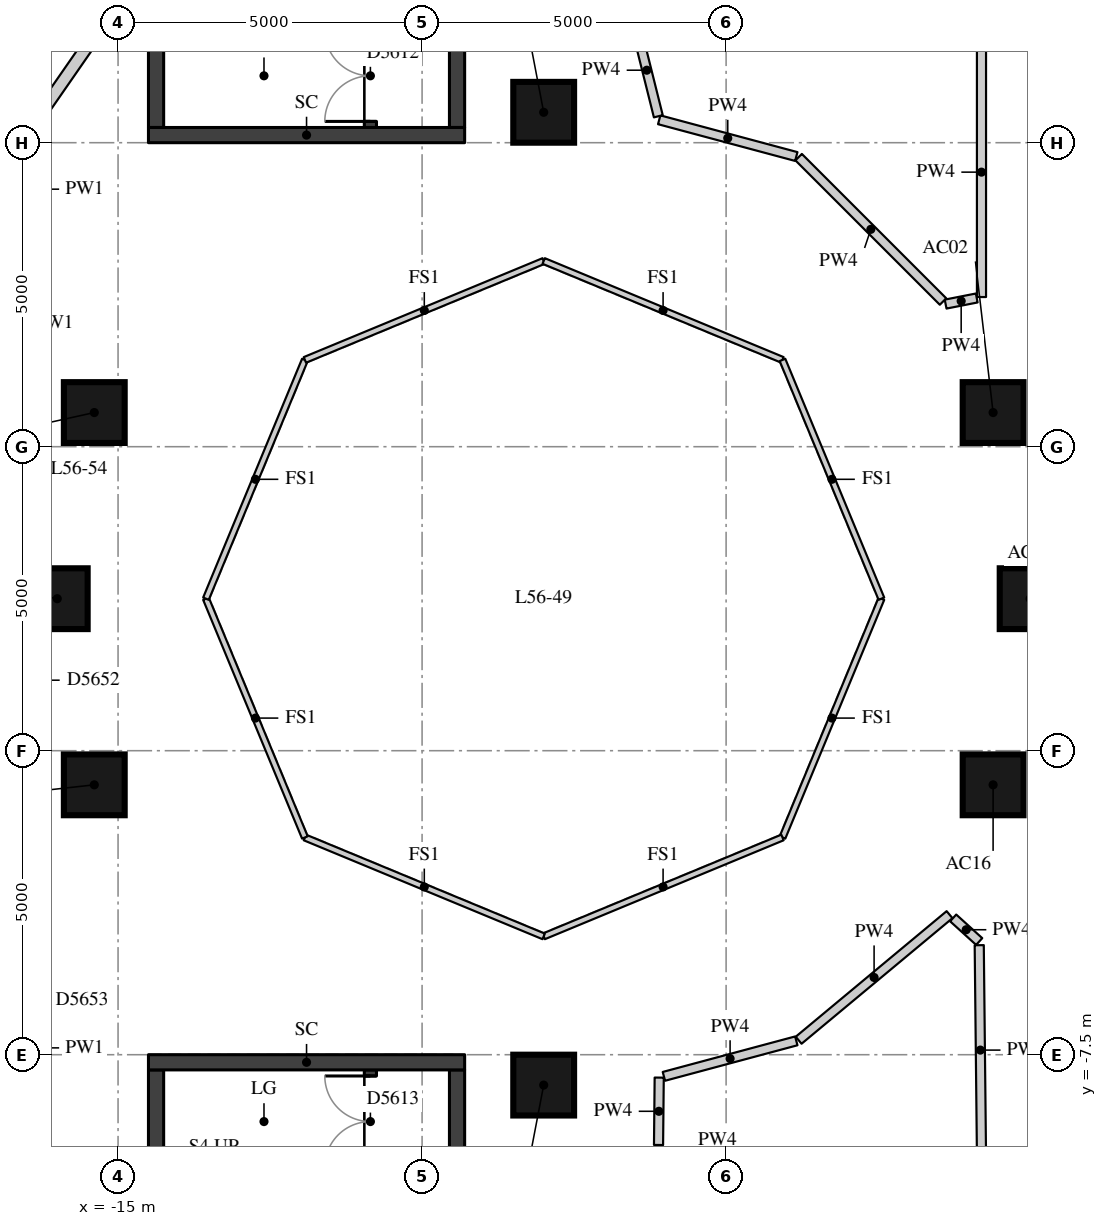
"""IFC4 building model, lengths in metres.
Left out: names, types, materials, properties, quantities, classifications, styles, units other than length and angle.
Written with IfcOpenShell. Run it as: python <this file> out.ifc"""

import sys

from ifc_helpers import new_model, si_unit, direction, frame, frame_2d, origin, origin_2d, place, context, subcontext, project, spatial, rectangle, extrude, element, fill, save


model = new_model("IFC4")
c1 = context("Model", 3, precision=1e-05, world=origin(), true_north=direction((0.0, 1.0)))
c2 = subcontext(c1, "Body", "Model", "MODEL_VIEW")
j1 = project(units=[si_unit("LENGTHUNIT", "METRE"), si_unit("PLANEANGLEUNIT", "RADIAN")], contexts=[c1])
p1 = place(None, origin())
s1 = spatial("IfcSite", under=j1, at=p1, CompositionType="ELEMENT")
p2 = place(p1, origin())
s2 = spatial("IfcBuilding", under=s1, at=p2, CompositionType="ELEMENT")
p3 = place(p2, frame((0.0, 0.0, 199.1)))
s3 = spatial("IfcBuildingStorey", under=s2, at=p3, CompositionType="ELEMENT", Elevation=199.1)
for number, where, z_axis, x_axis in (
    (1, (0.0, 0.0, 0.0), (0.0, 0.0, 1.0), (1.0, 0.0, 0.0)),
    (2, (-0.609, 3.062, 0.0), (0.0, 0.0, 1.0), (1.0, 0.0, 0.0)),
    (3, (-8.0, 8.0, 0.0), (0.0, 0.0, 1.0), (1.0, 0.0, 0.0)),
    (4, (-15.391, 3.062, 0.0), (0.0, 0.0, 1.0), (1.0, 0.0, 0.0)),
    (5, (-16.0, 0.0, 0.0), (0.0, 0.0, 1.0), (1.0, 0.0, 0.0)),
    (6, (-15.391, -3.062, 0.0), (0.0, 0.0, 1.0), (1.0, 0.0, 0.0)),
    (7, (-8.0, -8.0, 0.0), (0.0, 0.0, 1.0), (1.0, 0.0, 0.0)),
    (8, (-0.609, -3.062, 0.0), (0.0, 0.0, 1.0), (1.0, 0.0, 0.0)),
):
    element("IfcColumn", number, at=place(p3, frame(where, z_axis=z_axis, x_axis=x_axis)), inside=s3, PredefinedType="COLUMN", context=c2, shape_type="SweptSolid", body=[
        extrude(rectangle(XDim=1.0, YDim=1.0, at=origin_2d()), origin(), (0.0, 0.0, 1.0), 3.3),
    ])
p4 = place(p3, frame((-10.85, 7.75, 0.0), z_axis=(0.0, 0.0, 1.0), x_axis=(0.0, 1.0, 0.0)))
e9 = element("IfcWall", 9, at=p4, inside=s3, PredefinedType="SHEAR", context=c2, shape_type="SweptSolid", body=[
    extrude(rectangle(XDim=6.0, YDim=0.2, at=frame_2d((3.0, 0.0))), origin(), (0.0, 0.0, 1.0), 3.02),
])
p5 = place(p4, frame((0.1, 0.0, 0.0)))
e10 = element("IfcOpeningElement", 10, at=p5, cuts=e9, PredefinedType="OPENING", context=c2, shape_type="SweptSolid", body=[
    extrude(rectangle(XDim=1.5, YDim=2.1, at=frame_2d((0.75, 1.05))), frame((0.0, 0.11, 0.0), z_axis=(0.0, -1.0, 0.0), x_axis=(1.0, 0.0, 0.0)), (0.0, 0.0, 1.0), 0.22),
])
p6 = place(p3, frame((-10.85, -13.75, 0.0), z_axis=(0.0, 0.0, 1.0), x_axis=(0.0, 1.0, 0.0)))
e11 = element("IfcWall", 11, at=p6, inside=s3, PredefinedType="SHEAR", context=c2, shape_type="SweptSolid", body=[
    extrude(rectangle(XDim=6.0, YDim=0.2, at=frame_2d((3.0, 0.0))), origin(), (0.0, 0.0, 1.0), 3.02),
])
p7 = place(p6, frame((4.4, 0.0, 0.0)))
e12 = element("IfcOpeningElement", 12, at=p7, cuts=e11, PredefinedType="OPENING", context=c2, shape_type="SweptSolid", body=[
    extrude(rectangle(XDim=1.5, YDim=2.1, at=frame_2d((0.75, 1.05))), frame((0.0, 0.11, 0.0), z_axis=(0.0, -1.0, 0.0), x_axis=(1.0, 0.0, 0.0)), (0.0, 0.0, 1.0), 0.22),
])
p8 = place(p3, frame((-14.375, 7.75, -0.28), z_axis=(0.0, 0.0, 1.0), x_axis=(0.0, 1.0, 0.0)))
e13 = element("IfcWall", 13, at=p8, inside=s3, PredefinedType="SHEAR", context=c2, shape_type="SweptSolid", body=[
    extrude(rectangle(XDim=6.0, YDim=0.25, at=frame_2d((3.0, 0.0))), origin(), (0.0, 0.0, 1.0), 3.3),
])
p9 = place(p3, frame((-9.425, 7.75, -0.28), z_axis=(0.0, 0.0, 1.0), x_axis=(0.0, 1.0, 0.0)))
e14 = element("IfcWall", 14, at=p9, inside=s3, PredefinedType="SHEAR", context=c2, shape_type="SweptSolid", body=[
    extrude(rectangle(XDim=6.0, YDim=0.25, at=frame_2d((3.0, 0.0))), origin(), (0.0, 0.0, 1.0), 3.3),
])
p10 = place(p9, frame((2.1, 0.0, 0.28)))
e15 = element("IfcOpeningElement", 15, at=p10, cuts=e14, PredefinedType="OPENING", context=c2, shape_type="SweptSolid", body=[
    extrude(rectangle(XDim=1.5, YDim=2.1, at=frame_2d((0.75, 1.05))), frame((0.0, 0.135, 0.0), z_axis=(0.0, -1.0, 0.0), x_axis=(1.0, 0.0, 0.0)), (0.0, 0.0, 1.0), 0.27),
])
p11 = place(p3, frame((-14.5, 7.625, -0.28), z_axis=(0.0, 0.0, 1.0), x_axis=(1.0, 0.0, 0.0)))
e16 = element("IfcWall", 16, at=p11, inside=s3, PredefinedType="SHEAR", context=c2, shape_type="SweptSolid", body=[
    extrude(rectangle(XDim=5.2, YDim=0.25, at=frame_2d((2.6, 0.0))), origin(), (0.0, 0.0, 1.0), 3.3),
])
p12 = place(p3, frame((-14.375, -13.75, -0.28), z_axis=(0.0, 0.0, 1.0), x_axis=(0.0, 1.0, 0.0)))
e17 = element("IfcWall", 17, at=p12, inside=s3, PredefinedType="SHEAR", context=c2, shape_type="SweptSolid", body=[
    extrude(rectangle(XDim=6.0, YDim=0.25, at=frame_2d((3.0, 0.0))), origin(), (0.0, 0.0, 1.0), 3.3),
])
p13 = place(p3, frame((-9.425, -13.75, -0.28), z_axis=(0.0, 0.0, 1.0), x_axis=(0.0, 1.0, 0.0)))
e18 = element("IfcWall", 18, at=p13, inside=s3, PredefinedType="SHEAR", context=c2, shape_type="SweptSolid", body=[
    extrude(rectangle(XDim=6.0, YDim=0.25, at=frame_2d((3.0, 0.0))), origin(), (0.0, 0.0, 1.0), 3.3),
])
p14 = place(p13, frame((2.4, 0.0, 0.28)))
e19 = element("IfcOpeningElement", 19, at=p14, cuts=e18, PredefinedType="OPENING", context=c2, shape_type="SweptSolid", body=[
    extrude(rectangle(XDim=1.5, YDim=2.1, at=frame_2d((0.75, 1.05))), frame((0.0, 0.135, 0.0), z_axis=(0.0, -1.0, 0.0), x_axis=(1.0, 0.0, 0.0)), (0.0, 0.0, 1.0), 0.27),
])
p15 = place(p3, frame((-14.5, -7.625, -0.28), z_axis=(0.0, 0.0, 1.0), x_axis=(1.0, 0.0, 0.0)))
e20 = element("IfcWall", 20, at=p15, inside=s3, PredefinedType="SHEAR", context=c2, shape_type="SweptSolid", body=[
    extrude(rectangle(XDim=5.2, YDim=0.25, at=frame_2d((2.6, 0.0))), origin(), (0.0, 0.0, 1.0), 3.3),
])
p16 = place(p3, frame((-16.266, 7.989, 0.0), z_axis=(0.0, 0.0, 1.0), x_axis=(0.569860411146, 0.821741511552, 0.0)))
e21 = element("IfcWall", 21, at=p16, inside=s3, PredefinedType="PARTITIONING", context=c2, shape_type="SweptSolid", body=[
    extrude(rectangle(XDim=2.966, YDim=0.2, at=frame_2d((1.483, 0.0))), origin(), (0.0, 0.0, 1.0), 3.02),
])
p17 = place(p3, frame((-0.8, 9.07, 0.0), z_axis=(0.0, 0.0, 1.0), x_axis=(0.0, -1.0, 0.0)))
e22 = element("IfcWall", 22, at=p17, inside=s3, PredefinedType="PARTITIONING", context=c2, shape_type="SweptSolid", body=[
    extrude(rectangle(XDim=4.108, YDim=0.15, at=frame_2d((2.054, 0.0))), origin(), (0.0, 0.0, 1.0), 3.02),
])
p18 = place(p3, frame((-0.878, 4.946, 0.0), z_axis=(0.0, 0.0, 1.0), x_axis=(-0.981223514921, -0.192874087857, 0.0)))
e23 = element("IfcWall", 23, at=p18, inside=s3, PredefinedType="PARTITIONING", context=c2, shape_type="SweptSolid", body=[
    extrude(rectangle(XDim=0.521, YDim=0.15, at=frame_2d((0.261, 0.0))), origin(), (0.0, 0.0, 1.0), 3.02),
])
p19 = place(p3, frame((-1.432, 4.888, 0.0), z_axis=(0.0, 0.0, 1.0), x_axis=(-0.70714312975, 0.707070430754, 0.0)))
e24 = element("IfcWall", 24, at=p19, inside=s3, PredefinedType="PARTITIONING", context=c2, shape_type="SweptSolid", body=[
    extrude(rectangle(XDim=3.358, YDim=0.15, at=frame_2d((1.679, 0.0))), origin(), (0.0, 0.0, 1.0), 3.02),
])
p20 = place(p3, frame((-3.846, 7.272, 0.0), z_axis=(0.0, 0.0, 1.0), x_axis=(-0.965906023197, 0.258892939941, 0.0)))
e25 = element("IfcWall", 25, at=p20, inside=s3, PredefinedType="PARTITIONING", context=c2, shape_type="SweptSolid", body=[
    extrude(rectangle(XDim=2.334, YDim=0.15, at=frame_2d((1.167, 0.0))), origin(), (0.0, 0.0, 1.0), 3.02),
])
p21 = place(p3, frame((-6.115, 7.935, 0.0), z_axis=(0.0, 0.0, 1.0), x_axis=(-0.242425292239, 0.970170076679, 0.0)))
e26 = element("IfcWall", 26, at=p21, inside=s3, PredefinedType="PARTITIONING", context=c2, shape_type="SweptSolid", body=[
    extrude(rectangle(XDim=1.562, YDim=0.15, at=frame_2d((0.781, 0.0))), origin(), (0.0, 0.0, 1.0), 3.02),
])
p22 = place(p3, frame((-3.807, -7.262, 0.0), z_axis=(0.0, 0.0, 1.0), x_axis=(0.768654933145, 0.639663656739, 0.0)))
e27 = element("IfcWall", 27, at=p22, inside=s3, PredefinedType="PARTITIONING", context=c2, shape_type="SweptSolid", body=[
    extrude(rectangle(XDim=3.229, YDim=0.15, at=frame_2d((1.615, 0.0))), origin(), (0.0, 0.0, 1.0), 3.02),
])
p23 = place(p3, frame((-1.266, -5.25, 0.0), z_axis=(0.0, 0.0, 1.0), x_axis=(0.740704364941, -0.671831112525, 0.0)))
e28 = element("IfcWall", 28, at=p23, inside=s3, PredefinedType="PARTITIONING", context=c2, shape_type="SweptSolid", body=[
    extrude(rectangle(XDim=0.578, YDim=0.15, at=frame_2d((0.289, 0.0))), origin(), (0.0, 0.0, 1.0), 3.02),
])
p24 = place(p3, frame((-0.837, -5.699, 0.0), z_axis=(0.0, 0.0, 1.0), x_axis=(0.010681337428, -0.999942952888, 0.0)))
e29 = element("IfcWall", 29, at=p24, inside=s3, PredefinedType="PARTITIONING", context=c2, shape_type="SweptSolid", body=[
    extrude(rectangle(XDim=3.451, YDim=0.15, at=frame_2d((1.726, 0.0))), origin(), (0.0, 0.0, 1.0), 3.02),
])
p25 = place(p3, frame((-5.736, -9.385, 0.0), z_axis=(0.0, 0.0, 1.0), x_axis=(-0.740919573429, 0.671593765389, 0.0)))
e30 = element("IfcWall", 30, at=p25, inside=s3, PredefinedType="PARTITIONING", context=c2, shape_type="SweptSolid", body=[
    extrude(rectangle(XDim=0.507, YDim=0.15, at=frame_2d((0.253, 0.0))), origin(), (0.0, 0.0, 1.0), 3.02),
])
p26 = place(p3, frame((-6.111, -8.985, 0.0), z_axis=(0.0, 0.0, 1.0), x_axis=(0.010133870444, 0.999948651017, 0.0)))
e31 = element("IfcWall", 31, at=p26, inside=s3, PredefinedType="PARTITIONING", context=c2, shape_type="SweptSolid", body=[
    extrude(rectangle(XDim=1.108, YDim=0.15, at=frame_2d((0.554, 0.0))), origin(), (0.0, 0.0, 1.0), 3.02),
])
p27 = place(p3, frame((-6.023, -7.856, 0.0), z_axis=(0.0, 0.0, 1.0), x_axis=(0.965887119847, 0.25896345633, 0.0)))
e32 = element("IfcWall", 32, at=p27, inside=s3, PredefinedType="PARTITIONING", context=c2, shape_type="SweptSolid", body=[
    extrude(rectangle(XDim=2.254, YDim=0.15, at=frame_2d((1.127, 0.0))), origin(), (0.0, 0.0, 1.0), 3.02),
])
for number, where, z_axis, x_axis in (
    (33, (-2.446, 0.0, 0.0), (0.0, 0.0, 1.0), (-0.383, -0.924, 0.0)),
    (34, (-4.073, -3.927, 0.0), (0.0, 0.0, 1.0), (-0.924, -0.383, 0.0)),
    (35, (-8.0, -5.554, 0.0), (0.0, 0.0, 1.0), (-0.924, 0.383, 0.0)),
    (36, (-11.927, -3.927, 0.0), (0.0, 0.0, 1.0), (-0.383, 0.924, 0.0)),
    (37, (-13.554, 0.0, 0.0), (0.0, 0.0, 1.0), (0.383, 0.924, 0.0)),
    (38, (-11.927, 3.927, 0.0), (0.0, 0.0, 1.0), (0.924, 0.383, 0.0)),
    (39, (-8.0, 5.554, 0.0), (0.0, 0.0, 1.0), (0.924, -0.383, 0.0)),
    (40, (-4.073, 3.927, 0.0), (0.0, 0.0, 1.0), (0.383, -0.924, 0.0)),
):
    element("IfcWall", number, at=place(p3, frame(where, z_axis=z_axis, x_axis=x_axis)), inside=s3, PredefinedType="PARTITIONING", context=c2, shape_type="SweptSolid", body=[
        extrude(rectangle(XDim=4.251, YDim=0.1, at=frame_2d((2.125, 0.0))), origin(), (0.0, 0.0, 1.0), 3.02),
    ])
p28 = place(p5, origin())
e41 = element("IfcDoor", 41, at=p28, inside=s3, OperationType="DOUBLE_DOOR_SINGLE_SWING", PredefinedType="DOOR", context=c2, shape_type="SweptSolid", body=[
    extrude(rectangle(XDim=1.5, YDim=2.1, at=frame_2d((0.75, 1.05))), frame((0.0, 0.025, 0.0), z_axis=(0.0, -1.0, 0.0), x_axis=(1.0, 0.0, 0.0)), (0.0, 0.0, 1.0), 0.05),
])
fill(e10, e41)
p29 = place(p7, origin())
e42 = element("IfcDoor", 42, at=p29, inside=s3, OperationType="DOUBLE_DOOR_SINGLE_SWING", PredefinedType="DOOR", context=c2, shape_type="SweptSolid", body=[
    extrude(rectangle(XDim=1.5, YDim=2.1, at=frame_2d((0.75, 1.05))), frame((0.0, 0.025, 0.0), z_axis=(0.0, -1.0, 0.0), x_axis=(1.0, 0.0, 0.0)), (0.0, 0.0, 1.0), 0.05),
])
fill(e12, e42)
save(model, sys.argv[1])
